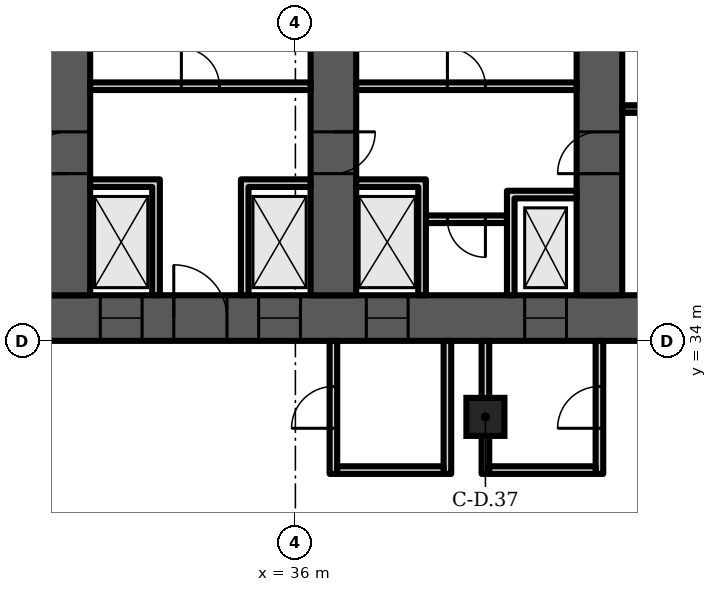
"""IFC4 building model, lengths in metres.
Left out: names, types, materials, properties, quantities, classifications, styles, units other than length and angle.
Written with IfcOpenShell. Run it as: python <this file> out.ifc"""

import sys

from ifc_helpers import new_model, si_unit, direction, frame, frame_2d, origin, origin_2d, place, context, subcontext, project, spatial, polyline, rectangle, outline, extrude, element, fill, save


model = new_model("IFC4")
c1 = context("Model", 3, precision=1e-05, world=origin(), true_north=direction((0.0, 1.0)))
c2 = subcontext(c1, "Body", "Model", "MODEL_VIEW")
j1 = project(units=[si_unit("LENGTHUNIT", "METRE"), si_unit("PLANEANGLEUNIT", "RADIAN")], contexts=[c1])
p1 = place(None, origin())
s1 = spatial("IfcSite", under=j1, at=p1, CompositionType="ELEMENT")
p2 = place(p1, origin())
s2 = spatial("IfcBuilding", under=s1, at=p2, CompositionType="ELEMENT")
p3 = place(p2, frame((0.0, 0.0, 8.0)))
s3 = spatial("IfcBuildingStorey", under=s2, at=p3, CompositionType="ELEMENT", Elevation=8.0)
p4 = place(p3, frame((41.0, 32.0, 0.0), z_axis=(0.0, 0.0, 1.0), x_axis=(1.0, 0.0, 0.0)))
e1 = element("IfcColumn", 1, at=p4, inside=s3, PredefinedType="COLUMN", context=c2, shape_type="SweptSolid", body=[
    extrude(rectangle(XDim=1.0, YDim=1.0, at=origin_2d()), origin(), (0.0, 0.0, 1.0), 7.0),
])
p5 = place(p3, frame((9.0, 34.6, 0.0), z_axis=(0.0, 0.0, 1.0), x_axis=(1.0, 0.0, 0.0)))
e2 = element("IfcWall", 2, at=p5, inside=s3, PredefinedType="SHEAR", context=c2, shape_type="SweptSolid", body=[
    extrude(rectangle(XDim=56.0, YDim=1.2, at=frame_2d((28.0, 0.0))), origin(), (0.0, 0.0, 1.0), 6.7),
])
p6 = place(p5, frame((2.0, 0.0, 0.0)))
e3 = element("IfcOpeningElement", 3, at=p6, cuts=e2, PredefinedType="OPENING", context=c2, shape_type="SweptSolid", body=[
    extrude(rectangle(XDim=1.0, YDim=2.1, at=frame_2d((0.5, 1.05))), frame((0.0, 0.61, 0.0), z_axis=(0.0, -1.0, 0.0), x_axis=(1.0, 0.0, 0.0)), (0.0, 0.0, 1.0), 1.22),
])
p7 = place(p5, frame((4.6, 0.0, 0.0)))
e4 = element("IfcOpeningElement", 4, at=p7, cuts=e2, PredefinedType="OPENING", context=c2, shape_type="SweptSolid", body=[
    extrude(rectangle(XDim=1.0, YDim=2.1, at=frame_2d((0.5, 1.05))), frame((0.0, 0.61, 0.0), z_axis=(0.0, -1.0, 0.0), x_axis=(1.0, 0.0, 0.0)), (0.0, 0.0, 1.0), 1.22),
])
p8 = place(p5, frame((7.867, 0.0, 0.0)))
e5 = element("IfcOpeningElement", 5, at=p8, cuts=e2, PredefinedType="OPENING", context=c2, shape_type="SweptSolid", body=[
    extrude(rectangle(XDim=1.1, YDim=2.1, at=frame_2d((0.55, 1.05))), frame((0.0, 0.61, 0.0), z_axis=(0.0, -1.0, 0.0), x_axis=(1.0, 0.0, 0.0)), (0.0, 0.0, 1.0), 1.22),
])
p9 = place(p5, frame((12.033, 0.0, 0.0)))
e6 = element("IfcOpeningElement", 6, at=p9, cuts=e2, PredefinedType="OPENING", context=c2, shape_type="SweptSolid", body=[
    extrude(rectangle(XDim=1.1, YDim=2.1, at=frame_2d((0.55, 1.05))), frame((0.0, 0.61, 0.0), z_axis=(0.0, -1.0, 0.0), x_axis=(1.0, 0.0, 0.0)), (0.0, 0.0, 1.0), 1.22),
])
p10 = place(p5, frame((9.8, 0.0, 0.0)))
e7 = element("IfcOpeningElement", 7, at=p10, cuts=e2, PredefinedType="OPENING", context=c2, shape_type="SweptSolid", body=[
    extrude(rectangle(XDim=1.4, YDim=2.1, at=frame_2d((0.7, 1.05))), frame((0.0, 0.61, 0.0), z_axis=(0.0, -1.0, 0.0), x_axis=(1.0, 0.0, 0.0)), (0.0, 0.0, 1.0), 1.22),
])
p11 = place(p5, frame((14.65, 0.0, 0.0)))
e8 = element("IfcOpeningElement", 8, at=p11, cuts=e2, PredefinedType="OPENING", context=c2, shape_type="SweptSolid", body=[
    extrude(rectangle(XDim=1.2, YDim=2.1, at=frame_2d((0.6, 1.05))), frame((0.0, 0.61, 0.0), z_axis=(0.0, -1.0, 0.0), x_axis=(1.0, 0.0, 0.0)), (0.0, 0.0, 1.0), 1.22),
])
p12 = place(p5, frame((21.867, 0.0, 0.0)))
e9 = element("IfcOpeningElement", 9, at=p12, cuts=e2, PredefinedType="OPENING", context=c2, shape_type="SweptSolid", body=[
    extrude(rectangle(XDim=1.1, YDim=2.1, at=frame_2d((0.55, 1.05))), frame((0.0, 0.61, 0.0), z_axis=(0.0, -1.0, 0.0), x_axis=(1.0, 0.0, 0.0)), (0.0, 0.0, 1.0), 1.22),
])
p13 = place(p5, frame((26.033, 0.0, 0.0)))
e10 = element("IfcOpeningElement", 10, at=p13, cuts=e2, PredefinedType="OPENING", context=c2, shape_type="SweptSolid", body=[
    extrude(rectangle(XDim=1.1, YDim=2.1, at=frame_2d((0.55, 1.05))), frame((0.0, 0.61, 0.0), z_axis=(0.0, -1.0, 0.0), x_axis=(1.0, 0.0, 0.0)), (0.0, 0.0, 1.0), 1.22),
])
p14 = place(p5, frame((23.8, 0.0, 0.0)))
e11 = element("IfcOpeningElement", 11, at=p14, cuts=e2, PredefinedType="OPENING", context=c2, shape_type="SweptSolid", body=[
    extrude(rectangle(XDim=1.4, YDim=2.1, at=frame_2d((0.7, 1.05))), frame((0.0, 0.61, 0.0), z_axis=(0.0, -1.0, 0.0), x_axis=(1.0, 0.0, 0.0)), (0.0, 0.0, 1.0), 1.22),
])
p15 = place(p5, frame((28.867, 0.0, 0.0)))
e12 = element("IfcOpeningElement", 12, at=p15, cuts=e2, PredefinedType="OPENING", context=c2, shape_type="SweptSolid", body=[
    extrude(rectangle(XDim=1.1, YDim=2.1, at=frame_2d((0.55, 1.05))), frame((0.0, 0.61, 0.0), z_axis=(0.0, -1.0, 0.0), x_axis=(1.0, 0.0, 0.0)), (0.0, 0.0, 1.0), 1.22),
])
p16 = place(p5, frame((33.033, 0.0, 0.0)))
e13 = element("IfcOpeningElement", 13, at=p16, cuts=e2, PredefinedType="OPENING", context=c2, shape_type="SweptSolid", body=[
    extrude(rectangle(XDim=1.1, YDim=2.1, at=frame_2d((0.55, 1.05))), frame((0.0, 0.61, 0.0), z_axis=(0.0, -1.0, 0.0), x_axis=(1.0, 0.0, 0.0)), (0.0, 0.0, 1.0), 1.22),
])
p17 = place(p5, frame((40.15, 0.0, 0.0)))
e14 = element("IfcOpeningElement", 14, at=p17, cuts=e2, PredefinedType="OPENING", context=c2, shape_type="SweptSolid", body=[
    extrude(rectangle(XDim=1.2, YDim=2.1, at=frame_2d((0.6, 1.05))), frame((0.0, 0.61, 0.0), z_axis=(0.0, -1.0, 0.0), x_axis=(1.0, 0.0, 0.0)), (0.0, 0.0, 1.0), 1.22),
])
p18 = place(p5, frame((44.8, 0.0, 0.0)))
e15 = element("IfcOpeningElement", 15, at=p18, cuts=e2, PredefinedType="OPENING", context=c2, shape_type="SweptSolid", body=[
    extrude(rectangle(XDim=1.4, YDim=2.1, at=frame_2d((0.7, 1.05))), frame((0.0, 0.61, 0.0), z_axis=(0.0, -1.0, 0.0), x_axis=(1.0, 0.0, 0.0)), (0.0, 0.0, 1.0), 1.22),
])
p19 = place(p5, frame((49.867, 0.0, 0.0)))
e16 = element("IfcOpeningElement", 16, at=p19, cuts=e2, PredefinedType="OPENING", context=c2, shape_type="SweptSolid", body=[
    extrude(rectangle(XDim=1.1, YDim=2.1, at=frame_2d((0.55, 1.05))), frame((0.0, 0.61, 0.0), z_axis=(0.0, -1.0, 0.0), x_axis=(1.0, 0.0, 0.0)), (0.0, 0.0, 1.0), 1.22),
])
p20 = place(p5, frame((53.5, 0.0, 0.0)))
e17 = element("IfcOpeningElement", 17, at=p20, cuts=e2, PredefinedType="OPENING", context=c2, shape_type="SweptSolid", body=[
    extrude(rectangle(XDim=1.1, YDim=2.1, at=frame_2d((0.55, 1.05))), frame((0.0, 0.61, 0.0), z_axis=(0.0, -1.0, 0.0), x_axis=(1.0, 0.0, 0.0)), (0.0, 0.0, 1.0), 1.22),
])
p21 = place(p5, frame((51.567, 0.0, 0.0)))
e18 = element("IfcOpeningElement", 18, at=p21, cuts=e2, PredefinedType="OPENING", context=c2, shape_type="SweptSolid", body=[
    extrude(rectangle(XDim=1.4, YDim=2.1, at=frame_2d((0.7, 1.05))), frame((0.0, 0.61, 0.0), z_axis=(0.0, -1.0, 0.0), x_axis=(1.0, 0.0, 0.0)), (0.0, 0.0, 1.0), 1.22),
])
p22 = place(p3, frame((30.0, 35.2, 0.0), z_axis=(0.0, 0.0, 1.0), x_axis=(0.0, 1.0, 0.0)))
e19 = element("IfcWall", 19, at=p22, inside=s3, PredefinedType="SHEAR", context=c2, shape_type="SweptSolid", body=[
    extrude(rectangle(XDim=12.8, YDim=1.2, at=frame_2d((6.4, 0.0))), origin(), (0.0, 0.0, 1.0), 6.7),
])
p23 = place(p22, frame((3.2, 0.0, 0.0)))
e20 = element("IfcOpeningElement", 20, at=p23, cuts=e19, PredefinedType="OPENING", context=c2, shape_type="SweptSolid", body=[
    extrude(rectangle(XDim=1.1, YDim=2.1, at=frame_2d((0.55, 1.05))), frame((0.0, 0.61, 0.0), z_axis=(0.0, -1.0, 0.0), x_axis=(1.0, 0.0, 0.0)), (0.0, 0.0, 1.0), 1.22),
])
p24 = place(p3, frame((37.0, 35.2, 0.0), z_axis=(0.0, 0.0, 1.0), x_axis=(0.0, 1.0, 0.0)))
e21 = element("IfcWall", 21, at=p24, inside=s3, PredefinedType="SHEAR", context=c2, shape_type="SweptSolid", body=[
    extrude(rectangle(XDim=12.8, YDim=1.2, at=frame_2d((6.4, 0.0))), origin(), (0.0, 0.0, 1.0), 6.7),
])
p25 = place(p24, frame((3.2, 0.0, 0.0)))
e22 = element("IfcOpeningElement", 22, at=p25, cuts=e21, PredefinedType="OPENING", context=c2, shape_type="SweptSolid", body=[
    extrude(rectangle(XDim=1.1, YDim=2.1, at=frame_2d((0.55, 1.05))), frame((0.0, 0.61, 0.0), z_axis=(0.0, -1.0, 0.0), x_axis=(1.0, 0.0, 0.0)), (0.0, 0.0, 1.0), 1.22),
])
p26 = place(p24, frame((9.6, 0.0, 0.0)))
e23 = element("IfcOpeningElement", 23, at=p26, cuts=e21, PredefinedType="OPENING", context=c2, shape_type="SweptSolid", body=[
    extrude(rectangle(XDim=1.0, YDim=2.1, at=frame_2d((0.5, 1.05))), frame((0.0, 0.61, 0.0), z_axis=(0.0, -1.0, 0.0), x_axis=(1.0, 0.0, 0.0)), (0.0, 0.0, 1.0), 1.22),
])
p27 = place(p3, frame((44.0, 35.2, 0.0), z_axis=(0.0, 0.0, 1.0), x_axis=(0.0, 1.0, 0.0)))
e24 = element("IfcWall", 24, at=p27, inside=s3, PredefinedType="SHEAR", context=c2, shape_type="SweptSolid", body=[
    extrude(rectangle(XDim=12.8, YDim=1.2, at=frame_2d((6.4, 0.0))), origin(), (0.0, 0.0, 1.0), 6.7),
])
p28 = place(p27, frame((3.2, 0.0, 0.0)))
e25 = element("IfcOpeningElement", 25, at=p28, cuts=e24, PredefinedType="OPENING", context=c2, shape_type="SweptSolid", body=[
    extrude(rectangle(XDim=1.1, YDim=2.1, at=frame_2d((0.55, 1.05))), frame((0.0, 0.61, 0.0), z_axis=(0.0, -1.0, 0.0), x_axis=(1.0, 0.0, 0.0)), (0.0, 0.0, 1.0), 1.22),
])
p29 = place(p27, frame((9.6, 0.0, 0.0)))
e26 = element("IfcOpeningElement", 26, at=p29, cuts=e24, PredefinedType="OPENING", context=c2, shape_type="SweptSolid", body=[
    extrude(rectangle(XDim=1.0, YDim=2.1, at=frame_2d((0.5, 1.05))), frame((0.0, 0.61, 0.0), z_axis=(0.0, -1.0, 0.0), x_axis=(1.0, 0.0, 0.0)), (0.0, 0.0, 1.0), 1.22),
])
p30 = place(p3, frame((30.6, 40.7, 0.0), z_axis=(0.0, 0.0, 1.0), x_axis=(1.0, 0.0, 0.0)))
e27 = element("IfcWall", 27, at=p30, inside=s3, PredefinedType="PARTITIONING", context=c2, shape_type="SweptSolid", body=[
    extrude(rectangle(XDim=5.8, YDim=0.2, at=frame_2d((2.9, 0.0))), origin(), (0.0, 0.0, 1.0), 6.7),
])
p31 = place(p30, frame((2.4, 0.0, 0.0)))
e28 = element("IfcOpeningElement", 28, at=p31, cuts=e27, PredefinedType="OPENING", context=c2, shape_type="SweptSolid", body=[
    extrude(rectangle(XDim=1.0, YDim=2.1, at=frame_2d((0.5, 1.05))), frame((0.0, 0.11, 0.0), z_axis=(0.0, -1.0, 0.0), x_axis=(1.0, 0.0, 0.0)), (0.0, 0.0, 1.0), 0.22),
])
p32 = place(p3, frame((0.0, 0.0, -0.0)))
e29 = element("IfcWall", 29, at=p32, inside=s3, PredefinedType="PARTITIONING", context=c2, shape_type="SweptSolid", body=[
    extrude(outline(polyline([(32.233, 38.05), (30.6, 38.05), (30.6, 38.25), (32.233, 38.25), (32.433, 38.25), (32.433, 35.2), (32.233, 35.2), (32.233, 38.05)])), origin(), (0.0, 0.0, 1.0), 6.7),
])
p33 = place(p3, frame((0.0, 0.0, -0.0)))
e30 = element("IfcWall", 30, at=p33, inside=s3, PredefinedType="PARTITIONING", context=c2, shape_type="SweptSolid", body=[
    extrude(outline(polyline([(34.567, 38.25), (34.767, 38.25), (36.4, 38.25), (36.4, 38.05), (34.767, 38.05), (34.767, 35.2), (34.567, 35.2), (34.567, 38.25)])), origin(), (0.0, 0.0, 1.0), 6.7),
])
p34 = place(p3, frame((39.433, 37.2, 0.0), z_axis=(0.0, 0.0, 1.0), x_axis=(1.0, 0.0, 0.0)))
e31 = element("IfcWall", 31, at=p34, inside=s3, PredefinedType="PARTITIONING", context=c2, shape_type="SweptSolid", body=[
    extrude(rectangle(XDim=2.133, YDim=0.2, at=frame_2d((1.067, 0.0))), origin(), (0.0, 0.0, 1.0), 6.7),
])
p35 = place(p34, frame((0.567, 0.0, 0.0)))
e32 = element("IfcOpeningElement", 32, at=p35, cuts=e31, PredefinedType="OPENING", context=c2, shape_type="SweptSolid", body=[
    extrude(rectangle(XDim=1.0, YDim=2.1, at=frame_2d((0.5, 1.05))), frame((0.0, 0.11, 0.0), z_axis=(0.0, -1.0, 0.0), x_axis=(1.0, 0.0, 0.0)), (0.0, 0.0, 1.0), 0.22),
])
p36 = place(p3, frame((37.6, 40.7, 0.0), z_axis=(0.0, 0.0, 1.0), x_axis=(1.0, 0.0, 0.0)))
e33 = element("IfcWall", 33, at=p36, inside=s3, PredefinedType="PARTITIONING", context=c2, shape_type="SweptSolid", body=[
    extrude(rectangle(XDim=5.8, YDim=0.2, at=frame_2d((2.9, 0.0))), origin(), (0.0, 0.0, 1.0), 6.7),
])
p37 = place(p36, frame((2.4, 0.0, 0.0)))
e34 = element("IfcOpeningElement", 34, at=p37, cuts=e33, PredefinedType="OPENING", context=c2, shape_type="SweptSolid", body=[
    extrude(rectangle(XDim=1.0, YDim=2.1, at=frame_2d((0.5, 1.05))), frame((0.0, 0.11, 0.0), z_axis=(0.0, -1.0, 0.0), x_axis=(1.0, 0.0, 0.0)), (0.0, 0.0, 1.0), 0.22),
])
p38 = place(p3, frame((0.0, 0.0, -0.0)))
e35 = element("IfcWall", 35, at=p38, inside=s3, PredefinedType="PARTITIONING", context=c2, shape_type="SweptSolid", body=[
    extrude(outline(polyline([(41.567, 37.95), (41.767, 37.95), (43.4, 37.95), (43.4, 37.75), (41.767, 37.75), (41.767, 35.2), (41.567, 35.2), (41.567, 37.95)])), origin(), (0.0, 0.0, 1.0), 6.7),
])
p39 = place(p3, frame((0.0, 0.0, -0.0)))
e36 = element("IfcWall", 36, at=p39, inside=s3, PredefinedType="PARTITIONING", context=c2, shape_type="SweptSolid", body=[
    extrude(outline(polyline([(39.233, 38.05), (37.6, 38.05), (37.6, 38.25), (39.233, 38.25), (39.433, 38.25), (39.433, 35.2), (39.233, 35.2), (39.233, 38.05)])), origin(), (0.0, 0.0, 1.0), 6.7),
])
p40 = place(p3, frame((44.6, 40.1, 0.0), z_axis=(0.0, 0.0, 1.0), x_axis=(1.0, 0.0, 0.0)))
e37 = element("IfcWall", 37, at=p40, inside=s3, PredefinedType="SHEAR", context=c2, shape_type="SweptSolid", body=[
    extrude(rectangle(XDim=5.8, YDim=0.2, at=frame_2d((2.9, 0.0))), origin(), (0.0, 0.0, 1.0), 6.7),
])
p41 = place(p40, frame((3.325, 0.0, 0.0)))
e38 = element("IfcOpeningElement", 38, at=p41, cuts=e37, PredefinedType="OPENING", context=c2, shape_type="SweptSolid", body=[
    extrude(rectangle(XDim=1.2, YDim=2.1, at=frame_2d((0.6, 1.05))), frame((0.0, 0.11, 0.0), z_axis=(0.0, -1.0, 0.0), x_axis=(1.0, 0.0, 0.0)), (0.0, 0.0, 1.0), 0.22),
])
p42 = place(p40, frame((0.475, 0.0, 0.0)))
e39 = element("IfcOpeningElement", 39, at=p42, cuts=e37, PredefinedType="OPENING", context=c2, shape_type="SweptSolid", body=[
    extrude(rectangle(XDim=0.9, YDim=2.1, at=frame_2d((0.45, 1.05))), frame((0.0, 0.11, 0.0), z_axis=(0.0, -1.0, 0.0), x_axis=(1.0, 0.0, 0.0)), (0.0, 0.0, 1.0), 0.22),
])
p43 = place(p3, frame((37.0, 30.5, 0.0), z_axis=(0.0, 0.0, 1.0), x_axis=(0.0, 1.0, 0.0)))
e40 = element("IfcWall", 40, at=p43, inside=s3, PredefinedType="PARTITIONING", context=c2, shape_type="SweptSolid", body=[
    extrude(rectangle(XDim=3.5, YDim=0.2, at=frame_2d((1.75, 0.0))), origin(), (0.0, 0.0, 1.0), 6.7),
])
p44 = place(p43, frame((1.2, 0.0, 0.0)))
e41 = element("IfcOpeningElement", 41, at=p44, cuts=e40, PredefinedType="OPENING", context=c2, shape_type="SweptSolid", body=[
    extrude(rectangle(XDim=1.1, YDim=2.1, at=frame_2d((0.55, 1.05))), frame((0.0, 0.11, 0.0), z_axis=(0.0, -1.0, 0.0), x_axis=(1.0, 0.0, 0.0)), (0.0, 0.0, 1.0), 0.22),
])
p45 = place(p3, frame((40.0, 30.5, 0.0), z_axis=(0.0, 0.0, 1.0), x_axis=(0.0, 1.0, 0.0)))
e42 = element("IfcWall", 42, at=p45, inside=s3, PredefinedType="PARTITIONING", context=c2, shape_type="SweptSolid", body=[
    extrude(rectangle(XDim=3.5, YDim=0.2, at=frame_2d((1.75, 0.0))), origin(), (0.0, 0.0, 1.0), 6.7),
])
p46 = place(p3, frame((37.1, 30.6, 0.0), z_axis=(0.0, 0.0, 1.0), x_axis=(1.0, 0.0, 0.0)))
e43 = element("IfcWall", 43, at=p46, inside=s3, PredefinedType="PARTITIONING", context=c2, shape_type="SweptSolid", body=[
    extrude(rectangle(XDim=2.8, YDim=0.2, at=frame_2d((1.4, 0.0))), origin(), (0.0, 0.0, 1.0), 6.7),
])
p47 = place(p3, frame((41.0, 30.5, 0.0), z_axis=(0.0, 0.0, 1.0), x_axis=(0.0, 1.0, 0.0)))
e44 = element("IfcWall", 44, at=p47, inside=s3, PredefinedType="PARTITIONING", context=c2, shape_type="SweptSolid", body=[
    extrude(rectangle(XDim=3.5, YDim=0.2, at=frame_2d((1.75, 0.0))), origin(), (0.0, 0.0, 1.0), 6.7),
])
p48 = place(p3, frame((44.0, 30.5, 0.0), z_axis=(0.0, 0.0, 1.0), x_axis=(0.0, 1.0, 0.0)))
e45 = element("IfcWall", 45, at=p48, inside=s3, PredefinedType="PARTITIONING", context=c2, shape_type="SweptSolid", body=[
    extrude(rectangle(XDim=3.5, YDim=0.2, at=frame_2d((1.75, 0.0))), origin(), (0.0, 0.0, 1.0), 6.7),
])
p49 = place(p48, frame((1.2, 0.0, 0.0)))
e46 = element("IfcOpeningElement", 46, at=p49, cuts=e45, PredefinedType="OPENING", context=c2, shape_type="SweptSolid", body=[
    extrude(rectangle(XDim=1.1, YDim=2.1, at=frame_2d((0.55, 1.05))), frame((0.0, 0.11, 0.0), z_axis=(0.0, -1.0, 0.0), x_axis=(1.0, 0.0, 0.0)), (0.0, 0.0, 1.0), 0.22),
])
p50 = place(p3, frame((41.1, 30.6, 0.0), z_axis=(0.0, 0.0, 1.0), x_axis=(1.0, 0.0, 0.0)))
e47 = element("IfcWall", 47, at=p50, inside=s3, PredefinedType="PARTITIONING", context=c2, shape_type="SweptSolid", body=[
    extrude(rectangle(XDim=2.8, YDim=0.2, at=frame_2d((1.4, 0.0))), origin(), (0.0, 0.0, 1.0), 6.7),
])
p51 = place(p12, origin())
e48 = element("IfcDoor", 48, at=p51, inside=s3, OperationType="DOUBLE_DOOR_SLIDING", PredefinedType="DOOR", context=c2, shape_type="SweptSolid", body=[
    extrude(rectangle(XDim=1.1, YDim=2.1, at=frame_2d((0.55, 1.05))), frame((0.0, 0.025, 0.0), z_axis=(0.0, -1.0, 0.0), x_axis=(1.0, 0.0, 0.0)), (0.0, 0.0, 1.0), 0.05),
])
fill(e9, e48)
p52 = place(p13, origin())
e49 = element("IfcDoor", 49, at=p52, inside=s3, OperationType="DOUBLE_DOOR_SLIDING", PredefinedType="DOOR", context=c2, shape_type="SweptSolid", body=[
    extrude(rectangle(XDim=1.1, YDim=2.1, at=frame_2d((0.55, 1.05))), frame((0.0, 0.025, 0.0), z_axis=(0.0, -1.0, 0.0), x_axis=(1.0, 0.0, 0.0)), (0.0, 0.0, 1.0), 0.05),
])
fill(e10, e49)
p53 = place(p14, origin())
e50 = element("IfcDoor", 50, at=p53, inside=s3, OperationType="DOUBLE_DOOR_SINGLE_SWING", PredefinedType="DOOR", context=c2, shape_type="SweptSolid", body=[
    extrude(rectangle(XDim=1.4, YDim=2.1, at=frame_2d((0.7, 1.05))), frame((0.0, 0.025, 0.0), z_axis=(0.0, -1.0, 0.0), x_axis=(1.0, 0.0, 0.0)), (0.0, 0.0, 1.0), 0.05),
])
fill(e11, e50)
p54 = place(p31, origin())
e51 = element("IfcDoor", 51, at=p54, inside=s3, OperationType="SINGLE_SWING_LEFT", PredefinedType="DOOR", context=c2, shape_type="SweptSolid", body=[
    extrude(rectangle(XDim=1.0, YDim=2.1, at=frame_2d((0.5, 1.05))), frame((0.0, 0.025, 0.0), z_axis=(0.0, -1.0, 0.0), x_axis=(1.0, 0.0, 0.0)), (0.0, 0.0, 1.0), 0.05),
])
fill(e28, e51)
p55 = place(p35, origin())
e52 = element("IfcDoor", 52, at=p55, inside=s3, OperationType="SINGLE_SWING_RIGHT", PredefinedType="DOOR", context=c2, shape_type="SweptSolid", body=[
    extrude(rectangle(XDim=1.0, YDim=2.1, at=frame_2d((0.5, 1.05))), frame((0.0, 0.025, 0.0), z_axis=(0.0, -1.0, 0.0), x_axis=(1.0, 0.0, 0.0)), (0.0, 0.0, 1.0), 0.05),
])
fill(e32, e52)
p56 = place(p15, origin())
e53 = element("IfcDoor", 53, at=p56, inside=s3, OperationType="DOUBLE_DOOR_SLIDING", PredefinedType="DOOR", context=c2, shape_type="SweptSolid", body=[
    extrude(rectangle(XDim=1.1, YDim=2.1, at=frame_2d((0.55, 1.05))), frame((0.0, 0.025, 0.0), z_axis=(0.0, -1.0, 0.0), x_axis=(1.0, 0.0, 0.0)), (0.0, 0.0, 1.0), 0.05),
])
fill(e12, e53)
p57 = place(p16, origin())
e54 = element("IfcDoor", 54, at=p57, inside=s3, OperationType="DOUBLE_DOOR_SLIDING", PredefinedType="DOOR", context=c2, shape_type="SweptSolid", body=[
    extrude(rectangle(XDim=1.1, YDim=2.1, at=frame_2d((0.55, 1.05))), frame((0.0, 0.025, 0.0), z_axis=(0.0, -1.0, 0.0), x_axis=(1.0, 0.0, 0.0)), (0.0, 0.0, 1.0), 0.05),
])
fill(e13, e54)
p58 = place(p37, origin())
e55 = element("IfcDoor", 55, at=p58, inside=s3, OperationType="SINGLE_SWING_LEFT", PredefinedType="DOOR", context=c2, shape_type="SweptSolid", body=[
    extrude(rectangle(XDim=1.0, YDim=2.1, at=frame_2d((0.5, 1.05))), frame((0.0, 0.025, 0.0), z_axis=(0.0, -1.0, 0.0), x_axis=(1.0, 0.0, 0.0)), (0.0, 0.0, 1.0), 0.05),
])
fill(e34, e55)
p59 = place(p23, origin())
e56 = element("IfcDoor", 56, at=p59, inside=s3, OperationType="SINGLE_SWING_LEFT", PredefinedType="DOOR", context=c2, shape_type="SweptSolid", body=[
    extrude(rectangle(XDim=1.1, YDim=2.1, at=frame_2d((0.55, 1.05))), frame((0.0, 0.025, 0.0), z_axis=(0.0, -1.0, 0.0), x_axis=(1.0, 0.0, 0.0)), (0.0, 0.0, 1.0), 0.05),
])
fill(e20, e56)
p60 = place(p25, origin())
e57 = element("IfcDoor", 57, at=p60, inside=s3, OperationType="SINGLE_SWING_RIGHT", PredefinedType="DOOR", context=c2, shape_type="SweptSolid", body=[
    extrude(rectangle(XDim=1.1, YDim=2.1, at=frame_2d((0.55, 1.05))), frame((0.0, 0.025, 0.0), z_axis=(0.0, -1.0, 0.0), x_axis=(1.0, 0.0, 0.0)), (0.0, 0.0, 1.0), 0.05),
])
fill(e22, e57)
p61 = place(p28, origin())
e58 = element("IfcDoor", 58, at=p61, inside=s3, OperationType="SINGLE_SWING_LEFT", PredefinedType="DOOR", context=c2, shape_type="SweptSolid", body=[
    extrude(rectangle(XDim=1.1, YDim=2.1, at=frame_2d((0.55, 1.05))), frame((0.0, 0.025, 0.0), z_axis=(0.0, -1.0, 0.0), x_axis=(1.0, 0.0, 0.0)), (0.0, 0.0, 1.0), 0.05),
])
fill(e25, e58)
p62 = place(p44, origin())
e59 = element("IfcDoor", 59, at=p62, inside=s3, OperationType="SINGLE_SWING_LEFT", PredefinedType="DOOR", context=c2, shape_type="SweptSolid", body=[
    extrude(rectangle(XDim=1.1, YDim=2.1, at=frame_2d((0.55, 1.05))), frame((0.0, 0.025, 0.0), z_axis=(0.0, -1.0, 0.0), x_axis=(1.0, 0.0, 0.0)), (0.0, 0.0, 1.0), 0.05),
])
fill(e41, e59)
p63 = place(p49, origin())
e60 = element("IfcDoor", 60, at=p63, inside=s3, OperationType="SINGLE_SWING_LEFT", PredefinedType="DOOR", context=c2, shape_type="SweptSolid", body=[
    extrude(rectangle(XDim=1.1, YDim=2.1, at=frame_2d((0.55, 1.05))), frame((0.0, 0.025, 0.0), z_axis=(0.0, -1.0, 0.0), x_axis=(1.0, 0.0, 0.0)), (0.0, 0.0, 1.0), 0.05),
])
fill(e46, e60)
save(model, sys.argv[1])
